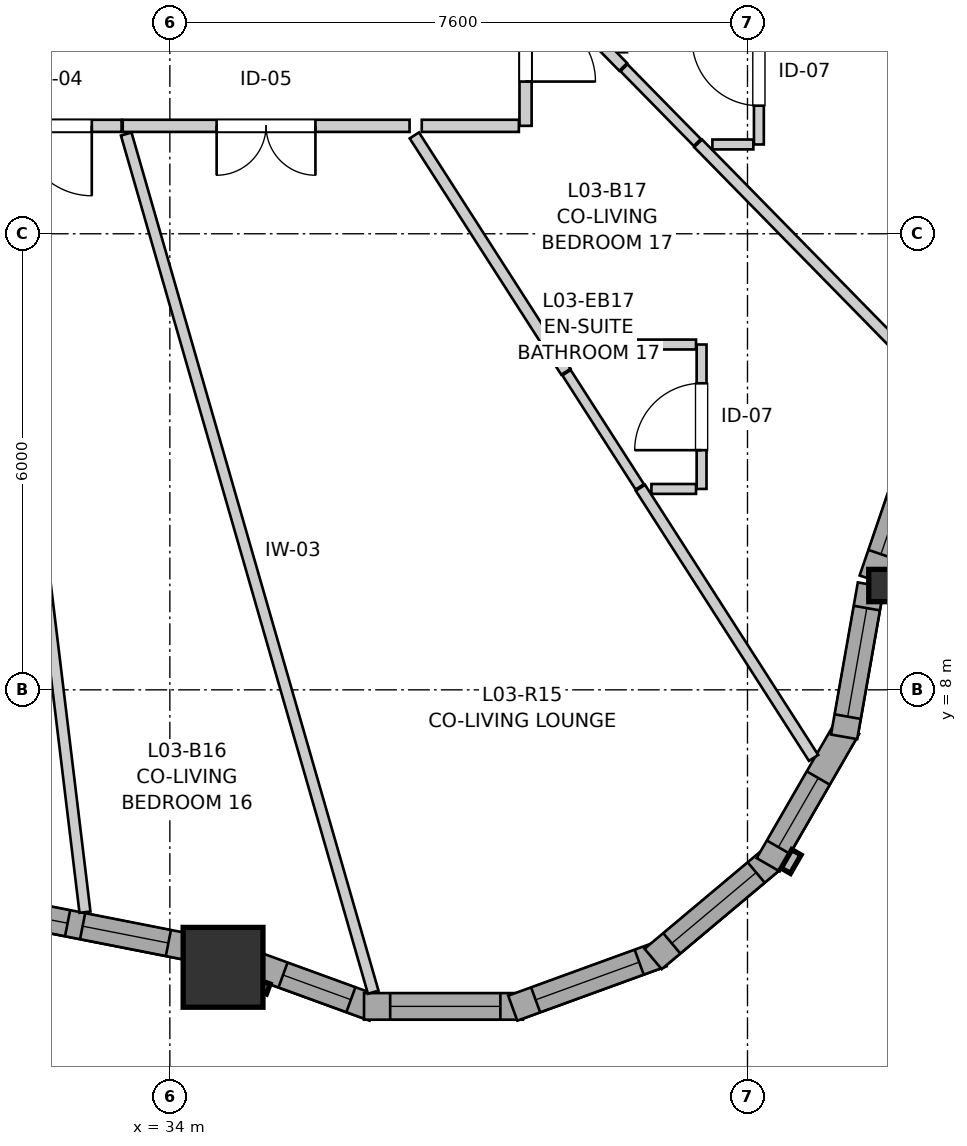
"""IFC4 building model, lengths in metres.
Left out: names, types, materials, properties, quantities, classifications, styles, units other than length and angle.
Written with IfcOpenShell. Run it as: python <this file> out.ifc"""

import sys

from ifc_helpers import new_model, si_unit, direction, frame, frame_2d, origin, origin_2d, place, context, subcontext, project, spatial, rectangle, i_section, extrude, source, transform, mapped, element, fill, save


model = new_model("IFC4")
c1 = context("Model", 3, precision=1e-05, world=origin(), true_north=direction((0.0, 1.0)))
c2 = subcontext(c1, "Body", "Model", "MODEL_VIEW")
j1 = project(units=[si_unit("LENGTHUNIT", "METRE"), si_unit("PLANEANGLEUNIT", "RADIAN")], contexts=[c1])
p1 = place(None, origin())
s1 = spatial("IfcSite", under=j1, at=p1, CompositionType="ELEMENT")
p2 = place(p1, origin())
s2 = spatial("IfcBuilding", under=s1, at=p2, CompositionType="ELEMENT")
p3 = place(p2, frame((0.0, 0.0, 14.2)))
s3 = spatial("IfcBuildingStorey", under=s2, at=p3, CompositionType="ELEMENT", Elevation=14.2)
m1 = source(origin(), c2, "Body", "SweptSolid", [
    extrude(rectangle(XDim=1.05, YDim=1.05, at=origin_2d()), origin(), (0.0, 0.0, 1.0), 2.94),
])
p4 = place(p3, frame((34.7, 4.349, 0.0), z_axis=(0.0, 0.0, 1.0), x_axis=(1.0, 0.0, 0.0)))
e1 = element("IfcColumn", 1, at=p4, inside=s3, PredefinedType="COLUMN", context=c2, shape_type="MappedRepresentation", body=[
    mapped(m1, transform((0.0, 0.0, 0.0), x_axis=(1.0, 0.0, 0.0), y_axis=(0.0, 1.0, 0.0), z_axis=(0.0, 0.0, 1.0), scale=1.0)),
])
m2 = source(origin(), c2, "Body", "SweptSolid", [
    extrude(i_section(OverallWidth=0.409, OverallDepth=0.425, WebThickness=0.03, FlangeThickness=0.048, FilletRadius=0.015, at=origin_2d()), origin(), (0.0, 0.0, 1.0), 2.94),
])
p5 = place(p3, frame((43.4, 9.372, 0.0), z_axis=(0.0, 0.0, 1.0), x_axis=(1.0, 0.0, 0.0)))
e2 = element("IfcColumn", 2, at=p5, inside=s3, PredefinedType="PILASTER", context=c2, shape_type="MappedRepresentation", body=[
    mapped(m2, transform((0.0, 0.0, 0.0), x_axis=(1.0, 0.0, 0.0), y_axis=(0.0, 1.0, 0.0), z_axis=(0.0, 0.0, 1.0), scale=1.0)),
])
p6 = place(p3, frame((31.248, 5.206, 0.0), z_axis=(0.0, 0.0, 1.0), x_axis=(0.981233354077, -0.192824025597, 0.0)))
e3 = element("IfcWall", 3, at=p6, inside=s3, PredefinedType="SOLIDWALL", context=c2, shape_type="SweptSolid", body=[
    extrude(rectangle(XDim=3.253, YDim=0.35, at=frame_2d((1.626, 0.0))), origin(), (0.0, 0.0, 1.0), 2.42),
])
p7 = place(p6, frame((0.284, 0.0, 0.82)))
e4 = element("IfcOpeningElement", 4, at=p7, cuts=e3, PredefinedType="OPENING", context=c2, shape_type="SweptSolid", body=[
    extrude(rectangle(XDim=1.15, YDim=1.2, at=frame_2d((0.575, 0.6))), frame((0.0, 0.185, 0.0), z_axis=(0.0, -1.0, 0.0), x_axis=(1.0, 0.0, 0.0)), (0.0, 0.0, 1.0), 0.37),
])
p8 = place(p6, frame((1.635, 0.0, 0.82)))
e5 = element("IfcOpeningElement", 5, at=p8, cuts=e3, PredefinedType="OPENING", context=c2, shape_type="SweptSolid", body=[
    extrude(rectangle(XDim=1.15, YDim=1.2, at=frame_2d((0.575, 0.6))), frame((0.0, 0.185, 0.0), z_axis=(0.0, -1.0, 0.0), x_axis=(1.0, 0.0, 0.0)), (0.0, 0.0, 1.0), 0.37),
])
p9 = place(p3, frame((35.042, 4.411, 0.0), z_axis=(0.0, 0.0, 1.0), x_axis=(0.9396916908, -0.34202269843, 0.0)))
e6 = element("IfcWall", 6, at=p9, inside=s3, PredefinedType="SOLIDWALL", context=c2, shape_type="SweptSolid", body=[
    extrude(rectangle(XDim=1.752, YDim=0.35, at=frame_2d((0.876, 0.0))), origin(), (0.0, 0.0, 1.0), 2.42),
])
p10 = place(p9, frame((0.476, 0.0, 0.82)))
e7 = element("IfcOpeningElement", 7, at=p10, cuts=e6, PredefinedType="OPENING", context=c2, shape_type="SweptSolid", body=[
    extrude(rectangle(XDim=0.95, YDim=1.35, at=frame_2d((0.475, 0.675))), frame((0.0, 0.185, 0.0), z_axis=(0.0, -1.0, 0.0), x_axis=(1.0, 0.0, 0.0)), (0.0, 0.0, 1.0), 0.37),
])
p11 = place(p3, frame((36.555, 3.835, 0.0), z_axis=(0.0, 0.0, 1.0), x_axis=(1.0, 0.0, 0.0)))
e8 = element("IfcWall", 8, at=p11, inside=s3, PredefinedType="SOLIDWALL", context=c2, shape_type="SweptSolid", body=[
    extrude(rectangle(XDim=2.091, YDim=0.35, at=frame_2d((1.045, 0.0))), origin(), (0.0, 0.0, 1.0), 2.42),
])
p12 = place(p11, frame((0.344, 0.0, 0.82)))
e9 = element("IfcOpeningElement", 9, at=p12, cuts=e8, PredefinedType="OPENING", context=c2, shape_type="SweptSolid", body=[
    extrude(rectangle(XDim=1.45, YDim=1.25, at=frame_2d((0.725, 0.625))), frame((0.0, 0.185, 0.0), z_axis=(0.0, -1.0, 0.0), x_axis=(1.0, 0.0, 0.0)), (0.0, 0.0, 1.0), 0.37),
])
p13 = place(p3, frame((38.512, 3.812, 0.0), z_axis=(0.0, 0.0, 1.0), x_axis=(0.939660353162, 0.342108784886, 0.0)))
e10 = element("IfcWall", 10, at=p13, inside=s3, PredefinedType="SOLIDWALL", context=c2, shape_type="SweptSolid", body=[
    extrude(rectangle(XDim=2.09, YDim=0.35, at=frame_2d((1.045, 0.0))), origin(), (0.0, 0.0, 1.0), 2.42),
])
p14 = place(p13, frame((0.32, 0.0, 0.82)))
e11 = element("IfcOpeningElement", 11, at=p14, cuts=e10, PredefinedType="OPENING", context=c2, shape_type="SweptSolid", body=[
    extrude(rectangle(XDim=1.45, YDim=1.25, at=frame_2d((0.725, 0.625))), frame((0.0, 0.185, 0.0), z_axis=(0.0, -1.0, 0.0), x_axis=(1.0, 0.0, 0.0)), (0.0, 0.0, 1.0), 0.37),
])
p15 = place(p3, frame((40.358, 4.459, 0.0), z_axis=(0.0, 0.0, 1.0), x_axis=(0.766082082368, 0.642742750308, 0.0)))
e12 = element("IfcWall", 12, at=p15, inside=s3, PredefinedType="SOLIDWALL", context=c2, shape_type="SweptSolid", body=[
    extrude(rectangle(XDim=2.09, YDim=0.35, at=frame_2d((1.045, 0.0))), origin(), (0.0, 0.0, 1.0), 2.42),
])
p16 = place(p15, frame((0.32, 0.0, 0.82)))
e13 = element("IfcOpeningElement", 13, at=p16, cuts=e12, PredefinedType="OPENING", context=c2, shape_type="SweptSolid", body=[
    extrude(rectangle(XDim=1.45, YDim=1.25, at=frame_2d((0.725, 0.625))), frame((0.0, 0.185, 0.0), z_axis=(0.0, -1.0, 0.0), x_axis=(1.0, 0.0, 0.0)), (0.0, 0.0, 1.0), 0.37),
])
p17 = place(p3, frame((41.873, 5.699, 0.0), z_axis=(0.0, 0.0, 1.0), x_axis=(0.49990781971, 0.866078617559, 0.0)))
e14 = element("IfcWall", 14, at=p17, inside=s3, PredefinedType="SOLIDWALL", context=c2, shape_type="SweptSolid", body=[
    extrude(rectangle(XDim=2.09, YDim=0.35, at=frame_2d((1.045, 0.0))), origin(), (0.0, 0.0, 1.0), 2.42),
])
p18 = place(p17, frame((0.268, 0.0, 0.82)))
e15 = element("IfcOpeningElement", 15, at=p18, cuts=e14, PredefinedType="OPENING", context=c2, shape_type="SweptSolid", body=[
    extrude(rectangle(XDim=1.05, YDim=1.45, at=frame_2d((0.525, 0.725))), frame((0.0, 0.185, 0.0), z_axis=(0.0, -1.0, 0.0), x_axis=(1.0, 0.0, 0.0)), (0.0, 0.0, 1.0), 0.37),
])
p19 = place(p3, frame((42.871, 7.382, 0.0), z_axis=(0.0, 0.0, 1.0), x_axis=(0.173586593252, 0.984818610021, 0.0)))
e16 = element("IfcWall", 16, at=p19, inside=s3, PredefinedType="SOLIDWALL", context=c2, shape_type="SweptSolid", body=[
    extrude(rectangle(XDim=2.032, YDim=0.35, at=frame_2d((1.016, 0.0))), origin(), (0.0, 0.0, 1.0), 2.42),
])
p20 = place(p19, frame((0.27, 0.0, 0.82)))
e17 = element("IfcOpeningElement", 17, at=p20, cuts=e16, PredefinedType="OPENING", context=c2, shape_type="SweptSolid", body=[
    extrude(rectangle(XDim=1.45, YDim=1.25, at=frame_2d((0.725, 0.625))), frame((0.0, 0.185, 0.0), z_axis=(0.0, -1.0, 0.0), x_axis=(1.0, 0.0, 0.0)), (0.0, 0.0, 1.0), 0.37),
])
p21 = place(p3, frame((43.241, 9.448, 0.0), z_axis=(0.0, 0.0, 1.0), x_axis=(0.323599751171, 0.946194060984, 0.0)))
e18 = element("IfcWall", 18, at=p21, inside=s3, PredefinedType="SOLIDWALL", context=c2, shape_type="SweptSolid", body=[
    extrude(rectangle(XDim=3.532, YDim=0.35, at=frame_2d((1.766, 0.0))), origin(), (0.0, 0.0, 1.0), 2.42),
])
p22 = place(p21, frame((0.356, 0.0, 0.82)))
e19 = element("IfcOpeningElement", 19, at=p22, cuts=e18, PredefinedType="OPENING", context=c2, shape_type="SweptSolid", body=[
    extrude(rectangle(XDim=2.1, YDim=1.4, at=frame_2d((1.05, 0.7))), frame((0.0, 0.185, 0.0), z_axis=(0.0, -1.0, 0.0), x_axis=(1.0, 0.0, 0.0)), (0.0, 0.0, 1.0), 0.37),
])
p23 = place(p3, frame((37.154, 15.42, 0.0), z_axis=(0.0, 0.0, 1.0), x_axis=(-1.0, 0.0, 0.0)))
e20 = element("IfcWall", 20, at=p23, inside=s3, PredefinedType="PARTITIONING", context=c2, shape_type="SweptSolid", body=[
    extrude(rectangle(XDim=3.774, YDim=0.16, at=frame_2d((1.887, 0.0))), origin(), (0.0, 0.0, 1.0), 2.94),
])
p24 = place(p23, frame((1.239, 0.0, 0.0)))
e21 = element("IfcOpeningElement", 21, at=p24, cuts=e20, PredefinedType="OPENING", context=c2, shape_type="SweptSolid", body=[
    extrude(rectangle(XDim=1.3, YDim=2.1, at=frame_2d((0.65, 1.05))), frame((0.0, 0.09, 0.0), z_axis=(0.0, -1.0, 0.0), x_axis=(1.0, 0.0, 0.0)), (0.0, 0.0, 1.0), 0.18),
])
p25 = place(p3, frame((38.68, 17.469, 0.0), z_axis=(0.0, 0.0, 1.0), x_axis=(0.0, -1.0, 0.0)))
e22 = element("IfcWall", 22, at=p25, inside=s3, PredefinedType="PARTITIONING", context=c2, shape_type="SweptSolid", body=[
    extrude(rectangle(XDim=2.049, YDim=0.16, at=frame_2d((1.024, 0.0))), origin(), (0.0, 0.0, 1.0), 2.94),
])
p26 = place(p25, frame((0.546, 0.0, 0.0)))
e23 = element("IfcOpeningElement", 23, at=p26, cuts=e22, PredefinedType="OPENING", context=c2, shape_type="SweptSolid", body=[
    extrude(rectangle(XDim=0.92, YDim=2.1, at=frame_2d((0.46, 1.05))), frame((0.0, 0.09, 0.0), z_axis=(0.0, -1.0, 0.0), x_axis=(1.0, 0.0, 0.0)), (0.0, 0.0, 1.0), 0.18),
])
p27 = place(p3, frame((40.996, 10.643, 0.0), z_axis=(0.0, 0.0, 1.0), x_axis=(0.0, 1.0, 0.0)))
e24 = element("IfcWall", 24, at=p27, inside=s3, PredefinedType="PARTITIONING", context=c2, shape_type="SweptSolid", body=[
    extrude(rectangle(XDim=1.9, YDim=0.13, at=frame_2d((0.95, 0.0))), origin(), (0.0, 0.0, 1.0), 2.94),
])
p28 = place(p27, frame((0.51, 0.0, 0.0)))
e25 = element("IfcOpeningElement", 25, at=p28, cuts=e24, PredefinedType="OPENING", context=c2, shape_type="SweptSolid", body=[
    extrude(rectangle(XDim=0.88, YDim=2.05, at=frame_2d((0.44, 1.025))), frame((0.0, 0.075, 0.0), z_axis=(0.0, -1.0, 0.0), x_axis=(1.0, 0.0, 0.0)), (0.0, 0.0, 1.0), 0.15),
])
p29 = place(p3, frame((41.75, 15.175, 0.0), z_axis=(0.0, 0.0, 1.0), x_axis=(0.0, 1.0, 0.0)))
e26 = element("IfcWall", 26, at=p29, inside=s3, PredefinedType="PARTITIONING", context=c2, shape_type="SweptSolid", body=[
    extrude(rectangle(XDim=1.9, YDim=0.13, at=frame_2d((0.95, 0.0))), origin(), (0.0, 0.0, 1.0), 2.94),
])
p30 = place(p29, frame((0.51, 0.0, 0.0)))
e27 = element("IfcOpeningElement", 27, at=p30, cuts=e26, PredefinedType="OPENING", context=c2, shape_type="SweptSolid", body=[
    extrude(rectangle(XDim=0.88, YDim=2.05, at=frame_2d((0.44, 1.025))), frame((0.0, 0.075, 0.0), z_axis=(0.0, -1.0, 0.0), x_axis=(1.0, 0.0, 0.0)), (0.0, 0.0, 1.0), 0.15),
])
p31 = place(p3, frame((33.365, 15.42, 0.0), z_axis=(0.0, 0.0, 1.0), x_axis=(-1.0, 0.0, 0.0)))
e28 = element("IfcWall", 28, at=p31, inside=s3, PredefinedType="PARTITIONING", context=c2, shape_type="SweptSolid", body=[
    extrude(rectangle(XDim=1.704, YDim=0.16, at=frame_2d((0.852, 0.0))), origin(), (0.0, 0.0, 1.0), 2.94),
])
p32 = place(p31, frame((0.392, 0.0, 0.0)))
e29 = element("IfcOpeningElement", 29, at=p32, cuts=e28, PredefinedType="OPENING", context=c2, shape_type="SweptSolid", body=[
    extrude(rectangle(XDim=0.92, YDim=2.1, at=frame_2d((0.46, 1.05))), frame((0.0, 0.09, 0.0), z_axis=(0.0, -1.0, 0.0), x_axis=(1.0, 0.0, 0.0)), (0.0, 0.0, 1.0), 0.18),
])
p33 = place(p3, frame((33.426, 15.312, 0.0), z_axis=(0.0, 0.0, 1.0), x_axis=(0.276606114731, -0.960983380342, 0.0)))
e30 = element("IfcWall", 30, at=p33, inside=s3, PredefinedType="PARTITIONING", context=c2, shape_type="SweptSolid", body=[
    extrude(rectangle(XDim=11.749, YDim=0.145, at=frame_2d((5.875, 0.0))), origin(), (0.0, 0.0, 1.0), 2.94),
])
p34 = place(p3, frame((31.643, 15.323, 0.0), z_axis=(0.0, 0.0, 1.0), x_axis=(0.120185874717, -0.992751406707, 0.0)))
e31 = element("IfcWall", 31, at=p34, inside=s3, PredefinedType="PARTITIONING", context=c2, shape_type="SweptSolid", body=[
    extrude(rectangle(XDim=10.323, YDim=0.145, at=frame_2d((5.162, 0.0))), origin(), (0.0, 0.0, 1.0), 2.94),
])
p35 = place(p3, frame((40.95, 15.19, 0.0), z_axis=(0.0, 0.0, 1.0), x_axis=(0.700142401903, -0.714003233226, 0.0)))
e32 = element("IfcWall", 32, at=p35, inside=s3, PredefinedType="PARTITIONING", context=c2, shape_type="SweptSolid", body=[
    extrude(rectangle(XDim=4.298, YDim=0.145, at=frame_2d((2.149, 0.0))), origin(), (0.0, 0.0, 1.0), 2.94),
])
p36 = place(p3, frame((40.191, 10.658, 0.0), z_axis=(0.0, 0.0, 1.0), x_axis=(0.539757550566, -0.841820519236, 0.0)))
e33 = element("IfcWall", 33, at=p36, inside=s3, PredefinedType="PARTITIONING", context=c2, shape_type="SweptSolid", body=[
    extrude(rectangle(XDim=4.221, YDim=0.145, at=frame_2d((2.111, 0.0))), origin(), (0.0, 0.0, 1.0), 2.94),
])
p37 = place(p3, frame((37.217, 15.294, 0.0), z_axis=(0.0, 0.0, 1.0), x_axis=(0.539878709929, -0.841742822105, 0.0)))
e34 = element("IfcWall", 34, at=p37, inside=s3, PredefinedType="PARTITIONING", context=c2, shape_type="SweptSolid", body=[
    extrude(rectangle(XDim=3.694, YDim=0.145, at=frame_2d((1.847, 0.0))), origin(), (0.0, 0.0, 1.0), 2.94),
])
p38 = place(p3, frame((38.817, 17.365, 0.0), z_axis=(0.0, 0.0, 1.0), x_axis=(0.70029627305, -0.713852316626, 0.0)))
e35 = element("IfcWall", 35, at=p38, inside=s3, PredefinedType="PARTITIONING", context=c2, shape_type="SweptSolid", body=[
    extrude(rectangle(XDim=1.639, YDim=0.145, at=frame_2d((0.819, 0.0))), origin(), (0.0, 0.0, 1.0), 2.94),
])
p39 = place(p3, frame((39.196, 12.543, 0.0), z_axis=(0.0, 0.0, 1.0), x_axis=(1.0, 0.0, 0.0)))
e36 = element("IfcWall", 36, at=p39, inside=s3, PredefinedType="PARTITIONING", context=c2, shape_type="SweptSolid", body=[
    extrude(rectangle(XDim=1.727, YDim=0.13, at=frame_2d((0.864, 0.0))), origin(), (0.0, 0.0, 1.0), 2.94),
])
p40 = place(p3, frame((39.219, 12.172, 0.0), z_axis=(0.0, 0.0, 1.0), x_axis=(0.539899826285, -0.84172927808, 0.0)))
e37 = element("IfcWall", 37, at=p40, inside=s3, PredefinedType="PARTITIONING", context=c2, shape_type="SweptSolid", body=[
    extrude(rectangle(XDim=1.784, YDim=0.13, at=frame_2d((0.892, 0.0))), origin(), (0.0, 0.0, 1.0), 2.94),
])
p41 = place(p3, frame((37.314, 15.42, 0.0), z_axis=(0.0, 0.0, 1.0), x_axis=(1.0, 0.0, 0.0)))
e38 = element("IfcWall", 38, at=p41, inside=s3, PredefinedType="PARTITIONING", context=c2, shape_type="SweptSolid", body=[
    extrude(rectangle(XDim=1.278, YDim=0.16, at=frame_2d((0.639, 0.0))), origin(), (0.0, 0.0, 1.0), 2.94),
])
p42 = place(p3, frame((39.975, 16.184, 0.0), z_axis=(0.0, 0.0, 1.0), x_axis=(0.700338966049, -0.713810431861, 0.0)))
e39 = element("IfcWall", 39, at=p42, inside=s3, PredefinedType="PARTITIONING", context=c2, shape_type="SweptSolid", body=[
    extrude(rectangle(XDim=1.377, YDim=0.13, at=frame_2d((0.689, 0.0))), origin(), (0.0, 0.0, 1.0), 2.94),
])
p43 = place(p3, frame((40.336, 10.643, 0.0), z_axis=(0.0, 0.0, 1.0), x_axis=(1.0, 0.0, 0.0)))
e40 = element("IfcWall", 40, at=p43, inside=s3, PredefinedType="PARTITIONING", context=c2, shape_type="SweptSolid", body=[
    extrude(rectangle(XDim=0.587, YDim=0.13, at=frame_2d((0.294, 0.0))), origin(), (0.0, 0.0, 1.0), 2.94),
])
p44 = place(p3, frame((41.138, 15.175, 0.0), z_axis=(0.0, 0.0, 1.0), x_axis=(1.0, 0.0, 0.0)))
e41 = element("IfcWall", 41, at=p44, inside=s3, PredefinedType="PARTITIONING", context=c2, shape_type="SweptSolid", body=[
    extrude(rectangle(XDim=0.539, YDim=0.13, at=frame_2d((0.27, 0.0))), origin(), (0.0, 0.0, 1.0), 2.94),
])
m3 = source(origin(), c2, "Body", "SweptSolid", [
    extrude(rectangle(XDim=1.15, YDim=1.2, at=frame_2d((0.575, 0.6))), frame((0.0, 0.03, 0.0), z_axis=(0.0, -1.0, 0.0), x_axis=(1.0, 0.0, 0.0)), (0.0, 0.0, 1.0), 0.06),
])
p45 = place(p7, origin())
e42 = element("IfcWindow", 42, at=p45, inside=s3, PartitioningType="SINGLE_PANEL", PredefinedType="WINDOW", context=c2, shape_type="MappedRepresentation", body=[
    mapped(m3, transform((0.0, 0.0, 0.0), x_axis=(1.0, 0.0, 0.0), y_axis=(0.0, 1.0, 0.0), z_axis=(0.0, 0.0, 1.0), scale=1.0)),
])
fill(e4, e42)
p46 = place(p8, origin())
e43 = element("IfcWindow", 43, at=p46, inside=s3, PartitioningType="SINGLE_PANEL", PredefinedType="WINDOW", context=c2, shape_type="MappedRepresentation", body=[
    mapped(m3, transform((0.0, 0.0, 0.0), x_axis=(1.0, 0.0, 0.0), y_axis=(0.0, 1.0, 0.0), z_axis=(0.0, 0.0, 1.0), scale=1.0)),
])
fill(e5, e43)
m4 = source(origin(), c2, "Body", "SweptSolid", [
    extrude(rectangle(XDim=0.95, YDim=1.35, at=frame_2d((0.475, 0.675))), frame((0.0, 0.03, 0.0), z_axis=(0.0, -1.0, 0.0), x_axis=(1.0, 0.0, 0.0)), (0.0, 0.0, 1.0), 0.06),
])
p47 = place(p10, origin())
e44 = element("IfcWindow", 44, at=p47, inside=s3, PartitioningType="SINGLE_PANEL", PredefinedType="WINDOW", context=c2, shape_type="MappedRepresentation", body=[
    mapped(m4, transform((0.0, 0.0, 0.0), x_axis=(1.0, 0.0, 0.0), y_axis=(0.0, 1.0, 0.0), z_axis=(0.0, 0.0, 1.0), scale=1.0)),
])
fill(e7, e44)
m5 = source(origin(), c2, "Body", "SweptSolid", [
    extrude(rectangle(XDim=1.45, YDim=1.25, at=frame_2d((0.725, 0.625))), frame((0.0, 0.03, 0.0), z_axis=(0.0, -1.0, 0.0), x_axis=(1.0, 0.0, 0.0)), (0.0, 0.0, 1.0), 0.06),
])
p48 = place(p12, origin())
e45 = element("IfcWindow", 45, at=p48, inside=s3, PartitioningType="SINGLE_PANEL", PredefinedType="WINDOW", context=c2, shape_type="MappedRepresentation", body=[
    mapped(m5, transform((0.0, 0.0, 0.0), x_axis=(1.0, 0.0, 0.0), y_axis=(0.0, 1.0, 0.0), z_axis=(0.0, 0.0, 1.0), scale=1.0)),
])
fill(e9, e45)
p49 = place(p14, origin())
e46 = element("IfcWindow", 46, at=p49, inside=s3, PartitioningType="SINGLE_PANEL", PredefinedType="WINDOW", context=c2, shape_type="MappedRepresentation", body=[
    mapped(m5, transform((0.0, 0.0, 0.0), x_axis=(1.0, 0.0, 0.0), y_axis=(0.0, 1.0, 0.0), z_axis=(0.0, 0.0, 1.0), scale=1.0)),
])
fill(e11, e46)
p50 = place(p16, origin())
e47 = element("IfcWindow", 47, at=p50, inside=s3, PartitioningType="SINGLE_PANEL", PredefinedType="WINDOW", context=c2, shape_type="MappedRepresentation", body=[
    mapped(m5, transform((0.0, 0.0, 0.0), x_axis=(1.0, 0.0, 0.0), y_axis=(0.0, 1.0, 0.0), z_axis=(0.0, 0.0, 1.0), scale=1.0)),
])
fill(e13, e47)
m6 = source(origin(), c2, "Body", "SweptSolid", [
    extrude(rectangle(XDim=1.05, YDim=1.45, at=frame_2d((0.525, 0.725))), frame((0.0, 0.03, 0.0), z_axis=(0.0, -1.0, 0.0), x_axis=(1.0, 0.0, 0.0)), (0.0, 0.0, 1.0), 0.06),
])
p51 = place(p18, origin())
e48 = element("IfcWindow", 48, at=p51, inside=s3, PartitioningType="SINGLE_PANEL", PredefinedType="WINDOW", context=c2, shape_type="MappedRepresentation", body=[
    mapped(m6, transform((0.0, 0.0, 0.0), x_axis=(1.0, 0.0, 0.0), y_axis=(0.0, 1.0, 0.0), z_axis=(0.0, 0.0, 1.0), scale=1.0)),
])
fill(e15, e48)
p52 = place(p20, origin())
e49 = element("IfcWindow", 49, at=p52, inside=s3, PartitioningType="SINGLE_PANEL", PredefinedType="WINDOW", context=c2, shape_type="MappedRepresentation", body=[
    mapped(m5, transform((0.0, 0.0, 0.0), x_axis=(1.0, 0.0, 0.0), y_axis=(0.0, 1.0, 0.0), z_axis=(0.0, 0.0, 1.0), scale=1.0)),
])
fill(e17, e49)
m7 = source(origin(), c2, "Body", "SweptSolid", [
    extrude(rectangle(XDim=2.1, YDim=1.4, at=frame_2d((1.05, 0.7))), frame((0.0, 0.03, 0.0), z_axis=(0.0, -1.0, 0.0), x_axis=(1.0, 0.0, 0.0)), (0.0, 0.0, 1.0), 0.06),
])
p53 = place(p22, origin())
e50 = element("IfcWindow", 50, at=p53, inside=s3, PartitioningType="SINGLE_PANEL", PredefinedType="WINDOW", context=c2, shape_type="MappedRepresentation", body=[
    mapped(m7, transform((0.0, 0.0, 0.0), x_axis=(1.0, 0.0, 0.0), y_axis=(0.0, 1.0, 0.0), z_axis=(0.0, 0.0, 1.0), scale=1.0)),
])
fill(e19, e50)
m8 = source(origin(), c2, "Body", "SweptSolid", [
    extrude(rectangle(XDim=1.3, YDim=2.1, at=frame_2d((0.65, 1.05))), frame((0.0, 0.025, 0.0), z_axis=(0.0, -1.0, 0.0), x_axis=(1.0, 0.0, 0.0)), (0.0, 0.0, 1.0), 0.05),
])
p54 = place(p24, origin())
e51 = element("IfcDoor", 51, at=p54, inside=s3, OperationType="DOUBLE_DOOR_SINGLE_SWING", PredefinedType="DOOR", context=c2, shape_type="MappedRepresentation", body=[
    mapped(m8, transform((0.0, 0.0, 0.0), x_axis=(1.0, 0.0, 0.0), y_axis=(0.0, 1.0, 0.0), z_axis=(0.0, 0.0, 1.0), scale=1.0)),
])
fill(e21, e51)
m9 = source(origin(), c2, "Body", "SweptSolid", [
    extrude(rectangle(XDim=0.92, YDim=2.1, at=frame_2d((0.46, 1.05))), frame((0.0, 0.025, 0.0), z_axis=(0.0, -1.0, 0.0), x_axis=(1.0, 0.0, 0.0)), (0.0, 0.0, 1.0), 0.05),
])
p55 = place(p26, origin())
e52 = element("IfcDoor", 52, at=p55, inside=s3, OperationType="SINGLE_SWING_RIGHT", PredefinedType="DOOR", context=c2, shape_type="MappedRepresentation", body=[
    mapped(m9, transform((0.0, 0.0, 0.0), x_axis=(1.0, 0.0, 0.0), y_axis=(0.0, 1.0, 0.0), z_axis=(0.0, 0.0, 1.0), scale=1.0)),
])
fill(e23, e52)
m10 = source(origin(), c2, "Body", "SweptSolid", [
    extrude(rectangle(XDim=0.88, YDim=2.05, at=frame_2d((0.44, 1.025))), frame((0.0, 0.025, 0.0), z_axis=(0.0, -1.0, 0.0), x_axis=(1.0, 0.0, 0.0)), (0.0, 0.0, 1.0), 0.05),
])
p56 = place(p28, origin())
e53 = element("IfcDoor", 53, at=p56, inside=s3, OperationType="SINGLE_SWING_LEFT", PredefinedType="DOOR", context=c2, shape_type="MappedRepresentation", body=[
    mapped(m10, transform((0.0, 0.0, 0.0), x_axis=(1.0, 0.0, 0.0), y_axis=(0.0, 1.0, 0.0), z_axis=(0.0, 0.0, 1.0), scale=1.0)),
])
fill(e25, e53)
p57 = place(p30, origin())
e54 = element("IfcDoor", 54, at=p57, inside=s3, OperationType="SINGLE_SWING_RIGHT", PredefinedType="DOOR", context=c2, shape_type="MappedRepresentation", body=[
    mapped(m10, transform((0.0, 0.0, 0.0), x_axis=(1.0, 0.0, 0.0), y_axis=(0.0, 1.0, 0.0), z_axis=(0.0, 0.0, 1.0), scale=1.0)),
])
fill(e27, e54)
p58 = place(p32, origin())
e55 = element("IfcDoor", 55, at=p58, inside=s3, OperationType="SINGLE_SWING_LEFT", PredefinedType="DOOR", context=c2, shape_type="MappedRepresentation", body=[
    mapped(m9, transform((0.0, 0.0, 0.0), x_axis=(1.0, 0.0, 0.0), y_axis=(0.0, 1.0, 0.0), z_axis=(0.0, 0.0, 1.0), scale=1.0)),
])
fill(e29, e55)
save(model, sys.argv[1])
